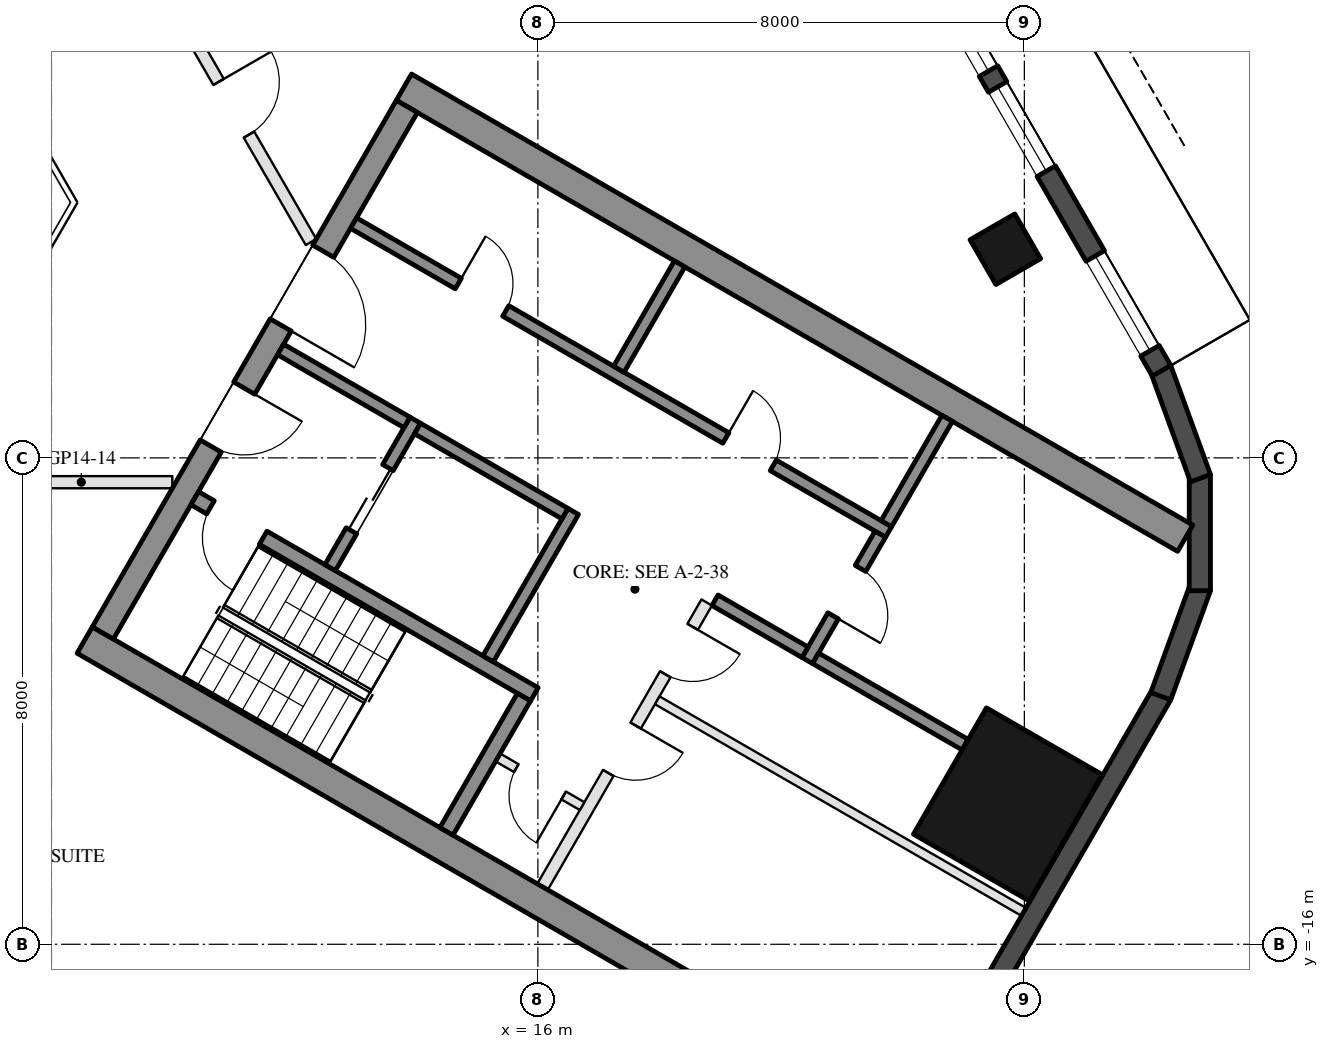
"""IFC4 building model, lengths in metres.
Left out: names, types, materials, properties, quantities, classifications, styles, units other than length and angle.
Written with IfcOpenShell. Run it as: python <this file> out.ifc"""

import sys

from ifc_helpers import new_model, si_unit, direction, frame, frame_2d, origin, origin_2d, place, context, subcontext, project, spatial, rectangle, hollow_rectangle, extrude, element, fill, save


model = new_model("IFC4")
c1 = context("Model", 3, precision=1e-05, world=origin(), true_north=direction((0.0, 1.0)))
c2 = subcontext(c1, "Body", "Model", "MODEL_VIEW")
j1 = project(units=[si_unit("LENGTHUNIT", "METRE"), si_unit("PLANEANGLEUNIT", "RADIAN")], contexts=[c1])
p1 = place(None, origin())
s1 = spatial("IfcSite", under=j1, at=p1, CompositionType="ELEMENT")
p2 = place(p1, origin())
s2 = spatial("IfcBuilding", under=s1, at=p2, CompositionType="ELEMENT")
p3 = place(p2, frame((0.0, 0.0, 165.1)))
s3 = spatial("IfcBuildingStorey", under=s2, at=p3, CompositionType="ELEMENT", Elevation=165.1)
p4 = place(p3, frame((23.688, -4.568, 0.0), z_axis=(0.0, 0.0, 1.0), x_axis=(-0.5, 0.866025403784, 0.0)))
e1 = element("IfcColumn", 1, at=p4, inside=s3, PredefinedType="COLUMN", context=c2, shape_type="SweptSolid", body=[
    extrude(hollow_rectangle(XDim=0.85, YDim=0.85, WallThickness=0.04, at=origin_2d()), origin(), (0.0, 0.0, 1.0), 3.7),
])
p5 = place(p3, frame((23.729, -13.7, 0.0), z_axis=(0.0, 0.0, 1.0), x_axis=(0.5, 0.866025403784, 0.0)))
e2 = element("IfcColumn", 2, at=p5, inside=s3, PredefinedType="COLUMN", context=c2, shape_type="SweptSolid", body=[
    extrude(hollow_rectangle(XDim=2.4, YDim=2.2, WallThickness=0.06, at=origin_2d()), origin(), (0.0, 0.0, 1.0), 3.7),
])
p6 = place(p3, frame((23.427, -16.792, 0.0), z_axis=(0.0, 0.0, 1.0), x_axis=(0.500018773155, 0.866014564827, 0.0)))
e3 = element("IfcWall", 3, at=p6, inside=s3, PredefinedType="SOLIDWALL", context=c2, shape_type="SweptSolid", body=[
    extrude(rectangle(XDim=5.658, YDim=0.35, at=frame_2d((2.829, 0.0))), origin(), (0.0, 0.0, 1.0), 3.55),
])
for number, where, z_axis, x_axis in (
    (4, (26.244, -11.92, 0.0), (0.0, 0.0, 1.0), (0.342, 0.94, 0.0)),
    (5, (26.886, -10.185, 0.0), (0.0, 0.0, 1.0), (0.0, 1.0, 0.0)),
    (6, (26.897, -8.335, 0.0), (0.0, 0.0, 1.0), (-0.342, 0.94, 0.0)),
):
    element("IfcWall", number, at=place(p3, frame(where, z_axis=z_axis, x_axis=x_axis)), inside=s3, PredefinedType="SOLIDWALL", context=c2, shape_type="SweptSolid", body=[
        extrude(rectangle(XDim=1.91, YDim=0.35, at=frame_2d((0.955, 0.0))), origin(), (0.0, 0.0, 1.0), 3.55),
    ])
p7 = place(p3, frame((26.257, -6.567, 0.0), z_axis=(0.0, 0.0, 1.0), x_axis=(-0.500023526245, 0.866011820475, 0.0)))
e7 = element("IfcWall", 7, at=p7, inside=s3, PredefinedType="SOLIDWALL", context=c2, shape_type="SweptSolid", body=[
    extrude(rectangle(XDim=11.816, YDim=0.35, at=frame_2d((5.908, 0.0))), origin(), (0.0, 0.0, 1.0), 3.55),
])
p8 = place(p7, frame((0.38, 0.0, 0.3)))
e8 = element("IfcOpeningElement", 8, at=p8, cuts=e7, PredefinedType="OPENING", context=c2, shape_type="SweptSolid", body=[
    extrude(rectangle(XDim=1.8, YDim=2.65, at=frame_2d((0.9, 1.325))), frame((0.0, 0.185, 0.0), z_axis=(0.0, -1.0, 0.0), x_axis=(1.0, 0.0, 0.0)), (0.0, 0.0, 1.0), 0.37),
])
p9 = place(p7, frame((7.741, 0.0, 0.0)))
e9 = element("IfcOpeningElement", 9, at=p9, cuts=e7, PredefinedType="OPENING", context=c2, shape_type="SweptSolid", body=[
    extrude(rectangle(XDim=2.4, YDim=2.4, at=frame_2d((1.2, 1.2))), frame((0.0, 0.185, 0.0), z_axis=(0.0, -1.0, 0.0), x_axis=(1.0, 0.0, 0.0)), (0.0, 0.0, 1.0), 0.37),
])
p10 = place(p7, frame((3.791, 0.0, 0.3)))
e10 = element("IfcOpeningElement", 10, at=p10, cuts=e7, PredefinedType="OPENING", context=c2, shape_type="SweptSolid", body=[
    extrude(rectangle(XDim=1.6, YDim=2.65, at=frame_2d((0.8, 1.325))), frame((0.0, 0.185, 0.0), z_axis=(0.0, -1.0, 0.0), x_axis=(1.0, 0.0, 0.0)), (0.0, 0.0, 1.0), 0.37),
])
p11 = place(p7, frame((5.691, 0.0, 0.3)))
e11 = element("IfcOpeningElement", 11, at=p11, cuts=e7, PredefinedType="OPENING", context=c2, shape_type="SweptSolid", body=[
    extrude(rectangle(XDim=1.6, YDim=2.65, at=frame_2d((0.8, 1.325))), frame((0.0, 0.185, 0.0), z_axis=(0.0, -1.0, 0.0), x_axis=(1.0, 0.0, 0.0)), (0.0, 0.0, 1.0), 0.37),
])
for number, where, z_axis, x_axis in (
    (12, (8.547, -10.997, 0.0), (0.0, 0.0, 1.0), (0.866, -0.5, 0.0)),
    (13, (13.797, -1.903, 0.0), (0.0, 0.0, 1.0), (0.866, -0.5, 0.0)),
):
    element("IfcWall", number, at=place(p3, frame(where, z_axis=z_axis, x_axis=x_axis)), inside=s3, PredefinedType="SHEAR", context=c2, shape_type="SweptSolid", body=[
        extrude(rectangle(XDim=14.837, YDim=0.5, at=frame_2d((7.418, 0.0))), origin(), (0.0, 0.0, 1.0), 3.5),
    ])
p12 = place(p3, frame((8.845, -10.88, 0.0), z_axis=(0.0, 0.0, 1.0), x_axis=(0.500004234368, 0.866022959057, 0.0)))
e14 = element("IfcWall", 14, at=p12, inside=s3, PredefinedType="SHEAR", context=c2, shape_type="SweptSolid", body=[
    extrude(rectangle(XDim=10.0, YDim=0.4, at=frame_2d((5.0, 0.0))), origin(), (0.0, 0.0, 1.0), 3.5),
])
p13 = place(p12, frame((3.55, 0.0, 0.0)))
e15 = element("IfcOpeningElement", 15, at=p13, cuts=e14, PredefinedType="OPENING", context=c2, shape_type="SweptSolid", body=[
    extrude(rectangle(XDim=1.1, YDim=2.1, at=frame_2d((0.55, 1.05))), frame((0.0, 0.21, 0.0), z_axis=(0.0, -1.0, 0.0), x_axis=(1.0, 0.0, 0.0)), (0.0, 0.0, 1.0), 0.42),
])
p14 = place(p12, frame((5.85, 0.0, 0.0)))
e16 = element("IfcOpeningElement", 16, at=p14, cuts=e14, PredefinedType="OPENING", context=c2, shape_type="SweptSolid", body=[
    extrude(rectangle(XDim=1.4, YDim=2.1, at=frame_2d((0.7, 1.05))), frame((0.0, 0.21, 0.0), z_axis=(0.0, -1.0, 0.0), x_axis=(1.0, 0.0, 0.0)), (0.0, 0.0, 1.0), 0.42),
])
p15 = place(p3, frame((10.356, -8.664, 0.0), z_axis=(0.0, 0.0, 1.0), x_axis=(0.866028629588, -0.499994412703, 0.0)))
e17 = element("IfcWall", 17, at=p15, inside=s3, PredefinedType="SHEAR", context=c2, shape_type="SweptSolid", body=[
    extrude(rectangle(XDim=6.45, YDim=0.25, at=frame_2d((3.225, 0.0))), origin(), (0.0, 0.0, 1.0), 3.5),
])
p16 = place(p15, frame((0.3, 0.0, 0.0)))
e18 = element("IfcOpeningElement", 18, at=p16, cuts=e17, PredefinedType="OPENING", context=c2, shape_type="SweptSolid", body=[
    extrude(rectangle(XDim=1.0, YDim=2.1, at=frame_2d((0.5, 1.05))), frame((0.0, 0.135, 0.0), z_axis=(0.0, -1.0, 0.0), x_axis=(1.0, 0.0, 0.0)), (0.0, 0.0, 1.0), 0.27),
])
p17 = place(p3, frame((14.496, -14.143, 0.0), z_axis=(0.0, 0.0, 1.0), x_axis=(0.500062241894, 0.865989465428, 0.0)))
e19 = element("IfcWall", 19, at=p17, inside=s3, PredefinedType="SHEAR", context=c2, shape_type="SweptSolid", body=[
    extrude(rectangle(XDim=2.55, YDim=0.25, at=frame_2d((1.275, 0.0))), origin(), (0.0, 0.0, 1.0), 3.5),
])
p18 = place(p3, frame((15.181, -11.305, 0.0), z_axis=(0.0, 0.0, 1.0), x_axis=(0.49994636267, 0.866056369097, 0.0)))
e20 = element("IfcWall", 20, at=p18, inside=s3, PredefinedType="SHEAR", context=c2, shape_type="SweptSolid", body=[
    extrude(rectangle(XDim=2.8, YDim=0.2, at=frame_2d((1.4, 0.0))), origin(), (0.0, 0.0, 1.0), 3.5),
])
p19 = place(p3, frame((12.583, -9.805, 0.0), z_axis=(0.0, 0.0, 1.0), x_axis=(0.49994636267, 0.866056369097, 0.0)))
e21 = element("IfcWall", 21, at=p19, inside=s3, PredefinedType="SHEAR", context=c2, shape_type="SweptSolid", body=[
    extrude(rectangle(XDim=2.8, YDim=0.2, at=frame_2d((1.4, 0.0))), origin(), (0.0, 0.0, 1.0), 3.5),
])
p20 = place(p19, frame((0.7, 0.0, 0.0)))
e22 = element("IfcOpeningElement", 22, at=p20, cuts=e21, PredefinedType="OPENING", context=c2, shape_type="SweptSolid", body=[
    extrude(rectangle(XDim=1.2, YDim=2.1, at=frame_2d((0.6, 1.05))), frame((0.0, 0.11, 0.0), z_axis=(0.0, -1.0, 0.0), x_axis=(1.0, 0.0, 0.0)), (0.0, 0.0, 1.0), 0.22),
])
p21 = place(p3, frame((11.768, -6.217, 0.0), z_axis=(0.0, 0.0, 1.0), x_axis=(0.866050077142, -0.499957262057, 0.0)))
e23 = element("IfcWall", 23, at=p21, inside=s3, PredefinedType="SHEAR", context=c2, shape_type="SweptSolid", body=[
    extrude(rectangle(XDim=2.4, YDim=0.2, at=frame_2d((1.2, 0.0))), origin(), (0.0, 0.0, 1.0), 3.5),
])
p22 = place(p3, frame((14.02, -7.517, 0.0), z_axis=(0.0, 0.0, 1.0), x_axis=(0.866034573852, -0.49998411664, 0.0)))
e24 = element("IfcWall", 24, at=p22, inside=s3, PredefinedType="SHEAR", context=c2, shape_type="SweptSolid", body=[
    extrude(rectangle(XDim=2.8, YDim=0.2, at=frame_2d((1.4, 0.0))), origin(), (0.0, 0.0, 1.0), 3.5),
])
p23 = place(p3, frame((12.968, -4.138, 0.0), z_axis=(0.0, 0.0, 1.0), x_axis=(0.866028328073, -0.49999493495, 0.0)))
e25 = element("IfcWall", 25, at=p23, inside=s3, PredefinedType="SHEAR", context=c2, shape_type="SweptSolid", body=[
    extrude(rectangle(XDim=10.16, YDim=0.2, at=frame_2d((5.08, 0.0))), origin(), (0.0, 0.0, 1.0), 3.5),
])
p24 = place(p23, frame((1.99, 0.0, 0.0)))
e26 = element("IfcOpeningElement", 26, at=p24, cuts=e25, PredefinedType="OPENING", context=c2, shape_type="SweptSolid", body=[
    extrude(rectangle(XDim=0.9, YDim=2.1, at=frame_2d((0.45, 1.05))), frame((0.0, 0.11, 0.0), z_axis=(0.0, -1.0, 0.0), x_axis=(1.0, 0.0, 0.0)), (0.0, 0.0, 1.0), 0.22),
])
p25 = place(p23, frame((7.07, 0.0, 0.0)))
e27 = element("IfcOpeningElement", 27, at=p25, cuts=e25, PredefinedType="OPENING", context=c2, shape_type="SweptSolid", body=[
    extrude(rectangle(XDim=0.9, YDim=2.1, at=frame_2d((0.45, 1.05))), frame((0.0, 0.11, 0.0), z_axis=(0.0, -1.0, 0.0), x_axis=(1.0, 0.0, 0.0)), (0.0, 0.0, 1.0), 0.22),
])
p26 = place(p3, frame((20.43, -11.333, 0.0), z_axis=(0.0, 0.0, 1.0), x_axis=(0.500001309137, 0.866024647952, 0.0)))
e28 = element("IfcWall", 28, at=p26, inside=s3, PredefinedType="SHEAR", context=c2, shape_type="SweptSolid", body=[
    extrude(rectangle(XDim=2.4, YDim=0.2, at=frame_2d((1.2, 0.0))), origin(), (0.0, 0.0, 1.0), 3.5),
])
p27 = place(p26, frame((0.85, 0.0, 0.0)))
e29 = element("IfcOpeningElement", 29, at=p27, cuts=e28, PredefinedType="OPENING", context=c2, shape_type="SweptSolid", body=[
    extrude(rectangle(XDim=0.9, YDim=2.1, at=frame_2d((0.45, 1.05))), frame((0.0, 0.11, 0.0), z_axis=(0.0, -1.0, 0.0), x_axis=(1.0, 0.0, 0.0)), (0.0, 0.0, 1.0), 0.22),
])
p28 = place(p3, frame((18.913, -10.342, 0.0), z_axis=(0.0, 0.0, 1.0), x_axis=(0.866038183914, -0.499977863513, 0.0)))
e30 = element("IfcWall", 30, at=p28, inside=s3, PredefinedType="SHEAR", context=c2, shape_type="SweptSolid", body=[
    extrude(rectangle(XDim=1.71, YDim=0.2, at=frame_2d((0.855, 0.0))), origin(), (0.0, 0.0, 1.0), 3.5),
])
for number, where, z_axis, x_axis in (
    (31, (17.331, -6.542, 0.0), (0.0, 0.0, 1.0), (0.5, 0.866, 0.0)),
    (32, (21.73, -9.082, 0.0), (0.0, 0.0, 1.0), (0.5, 0.866, 0.0)),
):
    element("IfcWall", number, at=place(p3, frame(where, z_axis=z_axis, x_axis=x_axis)), inside=s3, PredefinedType="SHEAR", context=c2, shape_type="SweptSolid", body=[
        extrude(rectangle(XDim=2.0, YDim=0.2, at=frame_2d((1.0, 0.0))), origin(), (0.0, 0.0, 1.0), 3.5),
    ])
p29 = place(p3, frame((20.567, -11.297, 0.0), z_axis=(0.0, 0.0, 1.0), x_axis=(0.866055327414, -0.49994816717, 0.0)))
e33 = element("IfcWall", 33, at=p29, inside=s3, PredefinedType="SHEAR", context=c2, shape_type="SweptSolid", body=[
    extrude(rectangle(XDim=2.84, YDim=0.2, at=frame_2d((1.42, 0.0))), origin(), (0.0, 0.0, 1.0), 3.5),
])
p30 = place(p3, frame((16.076, -15.055, 0.0), z_axis=(0.0, 0.0, 1.0), x_axis=(0.499995103361, 0.866028230842, 0.0)))
e34 = element("IfcWall", 34, at=p30, inside=s3, PredefinedType="PARTITIONING", context=c2, shape_type="SweptSolid", body=[
    extrude(rectangle(XDim=5.4, YDim=0.2, at=frame_2d((2.7, 0.0))), origin(), (0.0, 0.0, 1.0), 3.5),
])
p31 = place(p30, frame((2.163, 0.0, 0.0)))
e35 = element("IfcOpeningElement", 35, at=p31, cuts=e34, PredefinedType="OPENING", context=c2, shape_type="SweptSolid", body=[
    extrude(rectangle(XDim=0.9, YDim=2.1, at=frame_2d((0.45, 1.05))), frame((0.0, 0.11, 0.0), z_axis=(0.0, -1.0, 0.0), x_axis=(1.0, 0.0, 0.0)), (0.0, 0.0, 1.0), 0.22),
])
p32 = place(p30, frame((4.038, 0.0, 0.0)))
e36 = element("IfcOpeningElement", 36, at=p32, cuts=e34, PredefinedType="OPENING", context=c2, shape_type="SweptSolid", body=[
    extrude(rectangle(XDim=0.9, YDim=2.1, at=frame_2d((0.45, 1.05))), frame((0.0, 0.11, 0.0), z_axis=(0.0, -1.0, 0.0), x_axis=(1.0, 0.0, 0.0)), (0.0, 0.0, 1.0), 0.22),
])
p33 = place(p3, frame((15.342, -12.928, 0.0), z_axis=(0.0, 0.0, 1.0), x_axis=(0.865989903783, -0.500061482766, 0.0)))
e37 = element("IfcWall", 37, at=p33, inside=s3, PredefinedType="PARTITIONING", context=c2, shape_type="SweptSolid", body=[
    extrude(rectangle(XDim=1.6, YDim=0.15, at=frame_2d((0.8, 0.0))), origin(), (0.0, 0.0, 1.0), 3.5),
])
p34 = place(p33, frame((0.35, 0.0, 0.0)))
e38 = element("IfcOpeningElement", 38, at=p34, cuts=e37, PredefinedType="OPENING", context=c2, shape_type="SweptSolid", body=[
    extrude(rectangle(XDim=0.9, YDim=2.1, at=frame_2d((0.45, 1.05))), frame((0.0, 0.085, 0.0), z_axis=(0.0, -1.0, 0.0), x_axis=(1.0, 0.0, 0.0)), (0.0, 0.0, 1.0), 0.17),
])
p35 = place(p3, frame((17.963, -11.987, 0.0), z_axis=(0.0, 0.0, 1.0), x_axis=(0.866016523273, -0.500015381182, 0.0)))
e39 = element("IfcWall", 39, at=p35, inside=s3, PredefinedType="PARTITIONING", context=c2, shape_type="SweptSolid", body=[
    extrude(rectangle(XDim=6.95, YDim=0.15, at=frame_2d((3.475, 0.0))), origin(), (0.0, 0.0, 1.0), 3.5),
])
p36 = place(p3, frame((9.988, -8.4, 0.0), z_axis=(0.0, 0.0, 1.0), x_axis=(-1.0, 0.0, 0.0)))
e40 = element("IfcWall", 40, at=p36, inside=s3, PredefinedType="PARTITIONING", context=c2, shape_type="SweptSolid", body=[
    extrude(rectangle(XDim=7.488, YDim=0.2, at=frame_2d((3.744, 0.0))), origin(), (0.0, 0.0, 1.0), 2.95),
])
p37 = place(p36, frame((3.244, 0.0, 0.0)))
e41 = element("IfcOpeningElement", 41, at=p37, cuts=e40, PredefinedType="OPENING", context=c2, shape_type="SweptSolid", body=[
    extrude(rectangle(XDim=1.0, YDim=2.1, at=frame_2d((0.5, 1.05))), frame((0.0, 0.11, 0.0), z_axis=(0.0, -1.0, 0.0), x_axis=(1.0, 0.0, 0.0)), (0.0, 0.0, 1.0), 0.22),
])
p38 = place(p3, frame((9.729, -0.051, 0.0), z_axis=(0.0, 0.0, 1.0), x_axis=(0.500005339912, -0.866022320763, 0.0)))
e42 = element("IfcWall", 42, at=p38, inside=s3, PredefinedType="PARTITIONING", context=c2, shape_type="SweptSolid", body=[
    extrude(rectangle(XDim=5.08, YDim=0.2, at=frame_2d((2.54, 0.0))), origin(), (0.0, 0.0, 1.0), 2.95),
])
p39 = place(p38, frame((2.04, 0.0, 0.0)))
e43 = element("IfcOpeningElement", 43, at=p39, cuts=e42, PredefinedType="OPENING", context=c2, shape_type="SweptSolid", body=[
    extrude(rectangle(XDim=1.0, YDim=2.1, at=frame_2d((0.5, 1.05))), frame((0.0, 0.11, 0.0), z_axis=(0.0, -1.0, 0.0), x_axis=(1.0, 0.0, 0.0)), (0.0, 0.0, 1.0), 0.22),
])
p40 = place(p8, origin())
e44 = element("IfcWindow", 44, at=p40, inside=s3, PartitioningType="SINGLE_PANEL", PredefinedType="WINDOW", context=c2, shape_type="SweptSolid", body=[
    extrude(rectangle(XDim=1.8, YDim=2.65, at=frame_2d((0.9, 1.325))), frame((0.0, 0.03, 0.0), z_axis=(0.0, -1.0, 0.0), x_axis=(1.0, 0.0, 0.0)), (0.0, 0.0, 1.0), 0.06),
])
fill(e8, e44)
p41 = place(p10, origin())
e45 = element("IfcWindow", 45, at=p41, inside=s3, PartitioningType="SINGLE_PANEL", PredefinedType="WINDOW", context=c2, shape_type="SweptSolid", body=[
    extrude(rectangle(XDim=1.6, YDim=2.65, at=frame_2d((0.8, 1.325))), frame((0.0, 0.03, 0.0), z_axis=(0.0, -1.0, 0.0), x_axis=(1.0, 0.0, 0.0)), (0.0, 0.0, 1.0), 0.06),
])
fill(e10, e45)
p42 = place(p11, origin())
e46 = element("IfcWindow", 46, at=p42, inside=s3, PartitioningType="SINGLE_PANEL", PredefinedType="WINDOW", context=c2, shape_type="SweptSolid", body=[
    extrude(rectangle(XDim=1.6, YDim=2.65, at=frame_2d((0.8, 1.325))), frame((0.0, 0.03, 0.0), z_axis=(0.0, -1.0, 0.0), x_axis=(1.0, 0.0, 0.0)), (0.0, 0.0, 1.0), 0.06),
])
fill(e11, e46)
p43 = place(p20, origin())
e47 = element("IfcDoor", 47, at=p43, inside=s3, OperationType="DOUBLE_DOOR_SLIDING", PredefinedType="DOOR", context=c2, shape_type="SweptSolid", body=[
    extrude(rectangle(XDim=1.2, YDim=2.1, at=frame_2d((0.6, 1.05))), frame((0.0, 0.025, 0.0), z_axis=(0.0, -1.0, 0.0), x_axis=(1.0, 0.0, 0.0)), (0.0, 0.0, 1.0), 0.05),
])
fill(e22, e47)
p44 = place(p34, frame((0.9, 0.0, 0.0), z_axis=(0.0, 0.0, 1.0), x_axis=(-1.0, 0.0, 0.0)))
e48 = element("IfcDoor", 48, at=p44, inside=s3, OperationType="SINGLE_SWING_LEFT", PredefinedType="DOOR", context=c2, shape_type="SweptSolid", body=[
    extrude(rectangle(XDim=0.9, YDim=2.1, at=frame_2d((0.45, 1.05))), frame((0.0, 0.025, 0.0), z_axis=(0.0, -1.0, 0.0), x_axis=(1.0, 0.0, 0.0)), (0.0, 0.0, 1.0), 0.05),
])
fill(e38, e48)
p45 = place(p24, origin())
e49 = element("IfcDoor", 49, at=p45, inside=s3, OperationType="SINGLE_SWING_LEFT", PredefinedType="DOOR", context=c2, shape_type="SweptSolid", body=[
    extrude(rectangle(XDim=0.9, YDim=2.1, at=frame_2d((0.45, 1.05))), frame((0.0, 0.025, 0.0), z_axis=(0.0, -1.0, 0.0), x_axis=(1.0, 0.0, 0.0)), (0.0, 0.0, 1.0), 0.05),
])
fill(e26, e49)
p46 = place(p25, origin())
e50 = element("IfcDoor", 50, at=p46, inside=s3, OperationType="SINGLE_SWING_LEFT", PredefinedType="DOOR", context=c2, shape_type="SweptSolid", body=[
    extrude(rectangle(XDim=0.9, YDim=2.1, at=frame_2d((0.45, 1.05))), frame((0.0, 0.025, 0.0), z_axis=(0.0, -1.0, 0.0), x_axis=(1.0, 0.0, 0.0)), (0.0, 0.0, 1.0), 0.05),
])
fill(e27, e50)
p47 = place(p27, frame((0.9, 0.0, 0.0), z_axis=(0.0, 0.0, 1.0), x_axis=(-1.0, 0.0, 0.0)))
e51 = element("IfcDoor", 51, at=p47, inside=s3, OperationType="SINGLE_SWING_RIGHT", PredefinedType="DOOR", context=c2, shape_type="SweptSolid", body=[
    extrude(rectangle(XDim=0.9, YDim=2.1, at=frame_2d((0.45, 1.05))), frame((0.0, 0.025, 0.0), z_axis=(0.0, -1.0, 0.0), x_axis=(1.0, 0.0, 0.0)), (0.0, 0.0, 1.0), 0.05),
])
fill(e29, e51)
p48 = place(p31, frame((0.9, 0.0, 0.0), z_axis=(0.0, 0.0, 1.0), x_axis=(-1.0, 0.0, 0.0)))
e52 = element("IfcDoor", 52, at=p48, inside=s3, OperationType="SINGLE_SWING_LEFT", PredefinedType="DOOR", context=c2, shape_type="SweptSolid", body=[
    extrude(rectangle(XDim=0.9, YDim=2.1, at=frame_2d((0.45, 1.05))), frame((0.0, 0.025, 0.0), z_axis=(0.0, -1.0, 0.0), x_axis=(1.0, 0.0, 0.0)), (0.0, 0.0, 1.0), 0.05),
])
fill(e35, e52)
p49 = place(p32, frame((0.9, 0.0, 0.0), z_axis=(0.0, 0.0, 1.0), x_axis=(-1.0, 0.0, 0.0)))
e53 = element("IfcDoor", 53, at=p49, inside=s3, OperationType="SINGLE_SWING_LEFT", PredefinedType="DOOR", context=c2, shape_type="SweptSolid", body=[
    extrude(rectangle(XDim=0.9, YDim=2.1, at=frame_2d((0.45, 1.05))), frame((0.0, 0.025, 0.0), z_axis=(0.0, -1.0, 0.0), x_axis=(1.0, 0.0, 0.0)), (0.0, 0.0, 1.0), 0.05),
])
fill(e36, e53)
p50 = place(p13, frame((1.1, 0.0, 0.0), z_axis=(0.0, 0.0, 1.0), x_axis=(-1.0, 0.0, 0.0)))
e54 = element("IfcDoor", 54, at=p50, inside=s3, OperationType="SINGLE_SWING_LEFT", PredefinedType="DOOR", context=c2, shape_type="SweptSolid", body=[
    extrude(rectangle(XDim=1.1, YDim=2.1, at=frame_2d((0.55, 1.05))), frame((0.0, 0.025, 0.0), z_axis=(0.0, -1.0, 0.0), x_axis=(1.0, 0.0, 0.0)), (0.0, 0.0, 1.0), 0.05),
])
fill(e15, e54)
p51 = place(p14, frame((1.4, 0.0, 0.0), z_axis=(0.0, 0.0, 1.0), x_axis=(-1.0, 0.0, 0.0)))
e55 = element("IfcDoor", 55, at=p51, inside=s3, OperationType="DOUBLE_DOOR_SINGLE_SWING", PredefinedType="DOOR", context=c2, shape_type="SweptSolid", body=[
    extrude(rectangle(XDim=1.4, YDim=2.1, at=frame_2d((0.7, 1.05))), frame((0.0, 0.025, 0.0), z_axis=(0.0, -1.0, 0.0), x_axis=(1.0, 0.0, 0.0)), (0.0, 0.0, 1.0), 0.05),
])
fill(e16, e55)
p52 = place(p16, frame((1.0, 0.0, 0.0), z_axis=(0.0, 0.0, 1.0), x_axis=(-1.0, 0.0, 0.0)))
e56 = element("IfcDoor", 56, at=p52, inside=s3, OperationType="SINGLE_SWING_LEFT", PredefinedType="DOOR", context=c2, shape_type="SweptSolid", body=[
    extrude(rectangle(XDim=1.0, YDim=2.1, at=frame_2d((0.5, 1.05))), frame((0.0, 0.025, 0.0), z_axis=(0.0, -1.0, 0.0), x_axis=(1.0, 0.0, 0.0)), (0.0, 0.0, 1.0), 0.05),
])
fill(e18, e56)
p53 = place(p39, origin())
e57 = element("IfcDoor", 57, at=p53, inside=s3, OperationType="SINGLE_SWING_LEFT", PredefinedType="DOOR", context=c2, shape_type="SweptSolid", body=[
    extrude(rectangle(XDim=1.0, YDim=2.1, at=frame_2d((0.5, 1.05))), frame((0.0, 0.025, 0.0), z_axis=(0.0, -1.0, 0.0), x_axis=(1.0, 0.0, 0.0)), (0.0, 0.0, 1.0), 0.05),
])
fill(e43, e57)
save(model, sys.argv[1])
